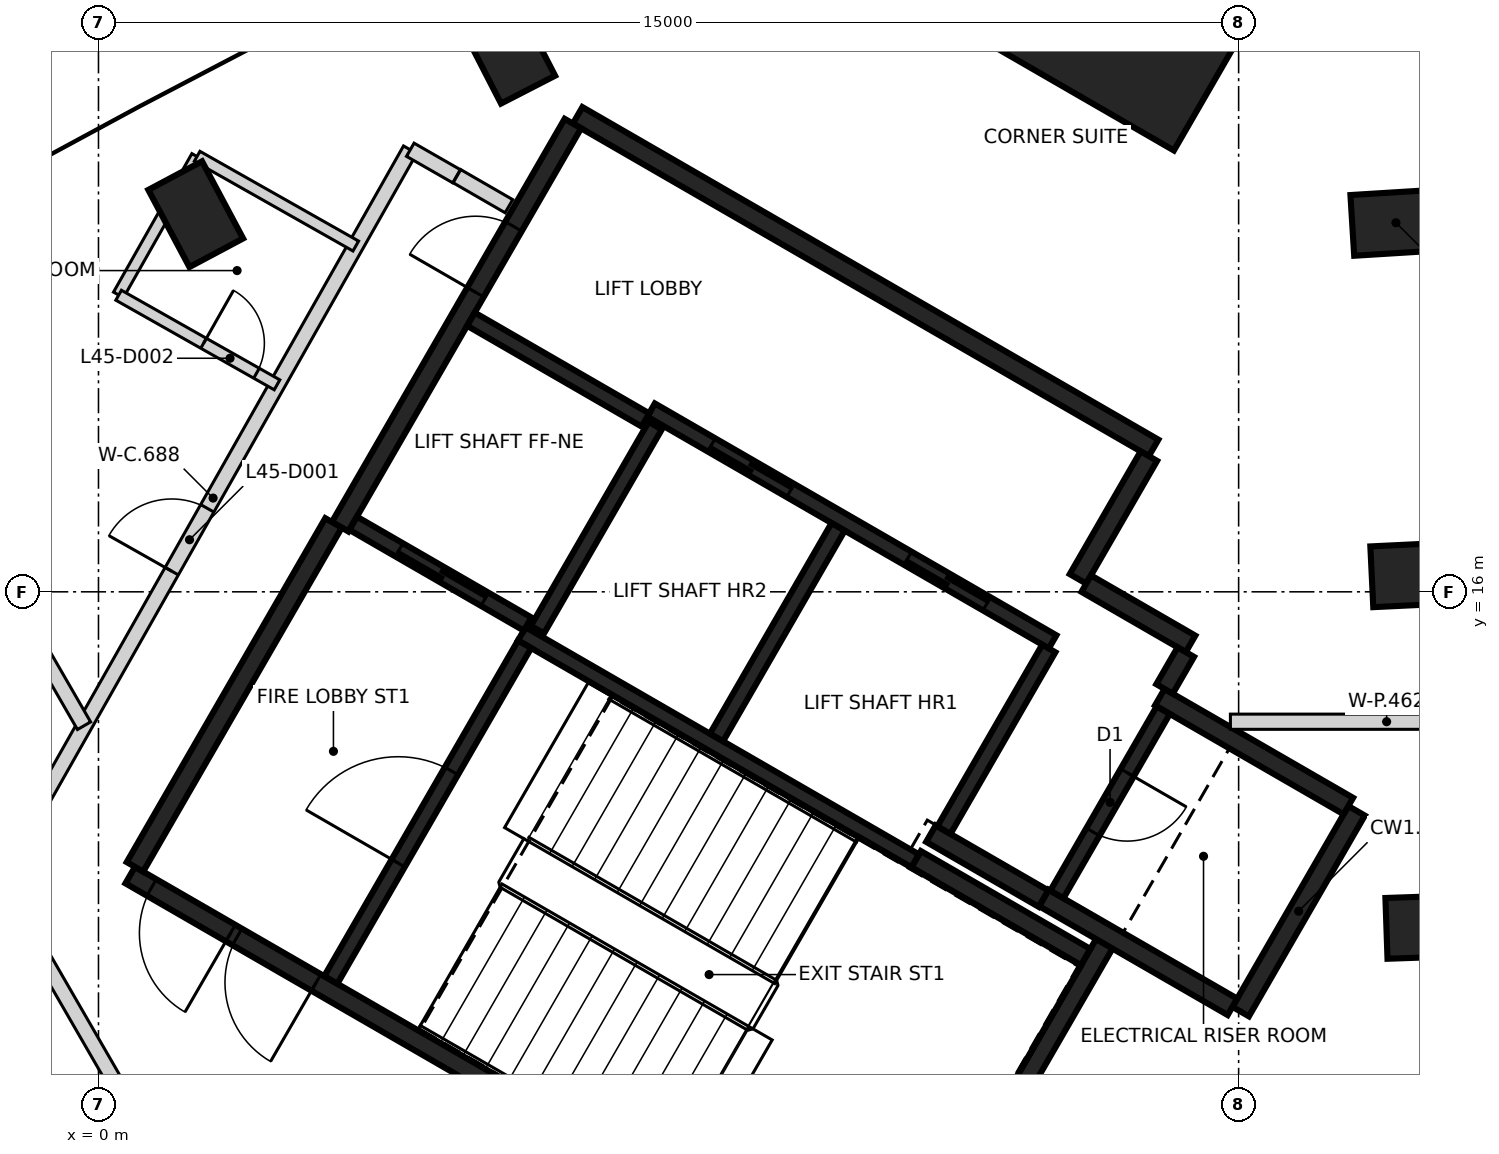
"""IFC4 building model, lengths in metres.
Left out: names, types, materials, properties, quantities, classifications, styles, units other than length and angle.
Written with IfcOpenShell. Run it as: python <this file> out.ifc"""

import sys

from ifc_helpers import new_model, si_unit, direction, frame, frame_2d, origin, origin_2d, place, context, subcontext, project, spatial, rectangle, extrude, element, fill, save


model = new_model("IFC4")
c1 = context("Model", 3, precision=1e-05, world=origin(), true_north=direction((0.0, 1.0)))
c2 = subcontext(c1, "Body", "Model", "MODEL_VIEW")
j1 = project(units=[si_unit("LENGTHUNIT", "METRE"), si_unit("PLANEANGLEUNIT", "RADIAN")], contexts=[c1])
p1 = place(None, origin())
s1 = spatial("IfcSite", under=j1, at=p1, CompositionType="ELEMENT")
p2 = place(p1, origin())
s2 = spatial("IfcBuilding", under=s1, at=p2, CompositionType="ELEMENT")
p3 = place(p2, frame((0.0, 0.0, 182.8)))
s3 = spatial("IfcBuildingStorey", under=s2, at=p3, CompositionType="ELEMENT", Elevation=182.8)
for number, where, z_axis, x_axis in (
    (1, (17.519, 11.592, -0.35), (0.0, 0.0, 1.0), (0.999, 0.034, 0.0)),
    (2, (17.326, 16.226, -0.35), (0.0, 0.0, 1.0), (0.999, 0.048, 0.0)),
    (3, (17.07, 20.856, -0.35), (0.0, 0.0, 1.0), (0.998, 0.062, 0.0)),
    (4, (5.388, 23.118, -0.35), (0.0, 0.0, 1.0), (-0.458, 0.889, 0.0)),
    (5, (1.279, 20.968, -0.35), (0.0, 0.0, 1.0), (-0.47, 0.883, 0.0)),
):
    element("IfcColumn", number, at=place(p3, frame(where, z_axis=z_axis, x_axis=x_axis)), inside=s3, PredefinedType="COLUMN", context=c2, shape_type="SweptSolid", body=[
        extrude(rectangle(XDim=1.15, YDim=0.8, at=origin_2d()), origin(), (0.0, 0.0, 1.0), 3.6),
    ])
p4 = place(p3, frame((13.78, 23.867, -0.35), z_axis=(0.0, 0.0, 1.0), x_axis=(0.5, 0.866025403784, 0.0)))
e6 = element("IfcColumn", 6, at=p4, inside=s3, PredefinedType="COLUMN", context=c2, shape_type="SweptSolid", body=[
    extrude(rectangle(XDim=3.2, YDim=2.7, at=origin_2d()), origin(), (0.0, 0.0, 1.0), 3.6),
])
p5 = place(p3, frame((10.42, 6.498, 0.0), z_axis=(0.0, 0.0, 1.0), x_axis=(-0.866021906294, 0.500006057782, 0.0)))
e7 = element("IfcWall", 7, at=p5, inside=s3, PredefinedType="SHEAR", context=c2, shape_type="SweptSolid", body=[
    extrude(rectangle(XDim=11.55, YDim=0.25, at=frame_2d((5.775, 0.0))), origin(), (0.0, 0.0, 1.0), 3.25),
])
p6 = place(p5, frame((10.025, 0.0, 0.0)))
e8 = element("IfcOpeningElement", 8, at=p6, cuts=e7, PredefinedType="OPENING", context=c2, shape_type="SweptSolid", body=[
    extrude(rectangle(XDim=1.2, YDim=2.1, at=frame_2d((0.6, 1.05))), frame((0.0, 0.135, 0.0), z_axis=(0.0, -1.0, 0.0), x_axis=(1.0, 0.0, 0.0)), (0.0, 0.0, 1.0), 0.27),
])
p7 = place(p5, frame((8.725, 0.0, 0.0)))
e9 = element("IfcOpeningElement", 9, at=p7, cuts=e7, PredefinedType="OPENING", context=c2, shape_type="SweptSolid", body=[
    extrude(rectangle(XDim=1.2, YDim=2.1, at=frame_2d((0.6, 1.05))), frame((0.0, 0.135, 0.0), z_axis=(0.0, -1.0, 0.0), x_axis=(1.0, 0.0, 0.0)), (0.0, 0.0, 1.0), 0.27),
])
p8 = place(p3, frame((6.304, 22.269, 0.0), z_axis=(0.0, 0.0, 1.0), x_axis=(0.866022959057, -0.500004234368, 0.0)))
e10 = element("IfcWall", 10, at=p8, inside=s3, PredefinedType="SHEAR", context=c2, shape_type="SweptSolid", body=[
    extrude(rectangle(XDim=8.75, YDim=0.25, at=frame_2d((4.375, 0.0))), origin(), (0.0, 0.0, 1.0), 3.25),
])
p9 = place(p3, frame((3.179, 16.856, 0.0), z_axis=(0.0, 0.0, 1.0), x_axis=(0.500001955336, 0.866024274868, 0.0)))
e11 = element("IfcWall", 11, at=p9, inside=s3, PredefinedType="SHEAR", context=c2, shape_type="SweptSolid", body=[
    extrude(rectangle(XDim=6.125, YDim=0.25, at=frame_2d((3.062, 0.0))), origin(), (0.0, 0.0, 1.0), 3.25),
])
p10 = place(p9, frame((3.563, 0.0, 0.0)))
e12 = element("IfcOpeningElement", 12, at=p10, cuts=e11, PredefinedType="OPENING", context=c2, shape_type="SweptSolid", body=[
    extrude(rectangle(XDim=1.0, YDim=2.1, at=frame_2d((0.5, 1.05))), frame((0.0, 0.135, 0.0), z_axis=(0.0, -1.0, 0.0), x_axis=(1.0, 0.0, 0.0)), (0.0, 0.0, 1.0), 0.27),
])
p11 = place(p3, frame((0.48, 12.381, 0.0), z_axis=(0.0, 0.0, 1.0), x_axis=(0.49999885962, 0.866026062182, 0.0)))
e13 = element("IfcWall", 13, at=p11, inside=s3, PredefinedType="SHEAR", context=c2, shape_type="SweptSolid", body=[
    extrude(rectangle(XDim=5.225, YDim=0.25, at=frame_2d((2.612, 0.0))), origin(), (0.0, 0.0, 1.0), 3.25),
])
p12 = place(p3, frame((13.238, 11.378, 0.0), z_axis=(0.0, 0.0, 1.0), x_axis=(-0.500008851346, -0.866020293397, 0.0)))
e14 = element("IfcWall", 14, at=p12, inside=s3, PredefinedType="SHEAR", context=c2, shape_type="SweptSolid", body=[
    extrude(rectangle(XDim=5.51, YDim=0.25, at=frame_2d((2.755, 0.0))), origin(), (0.0, 0.0, 1.0), 3.25),
])
p13 = place(p3, frame((16.552, 13.119, 0.0), z_axis=(0.0, 0.0, 1.0), x_axis=(-0.499978833458, -0.866037623948, 0.0)))
e15 = element("IfcWall", 15, at=p13, inside=s3, PredefinedType="SHEAR", context=c2, shape_type="SweptSolid", body=[
    extrude(rectangle(XDim=3.05, YDim=0.25, at=frame_2d((1.525, 0.0))), origin(), (0.0, 0.0, 1.0), 3.25),
])
p14 = place(p3, frame((14.918, 10.54, 0.0), z_axis=(0.0, 0.0, 1.0), x_axis=(-0.866063538972, 0.499933942099, 0.0)))
e16 = element("IfcWall", 16, at=p14, inside=s3, PredefinedType="SHEAR", context=c2, shape_type="SweptSolid", body=[
    extrude(rectangle(XDim=2.865, YDim=0.25, at=frame_2d((1.432, 0.0))), origin(), (0.0, 0.0, 1.0), 3.25),
])
p15 = place(p3, frame((13.963, 14.614, 0.0), z_axis=(0.0, 0.0, 1.0), x_axis=(0.866042235819, -0.499970844928, 0.0)))
e17 = element("IfcWall", 17, at=p15, inside=s3, PredefinedType="SHEAR", context=c2, shape_type="SweptSolid", body=[
    extrude(rectangle(XDim=2.865, YDim=0.25, at=frame_2d((1.432, 0.0))), origin(), (0.0, 0.0, 1.0), 3.25),
])
p16 = place(p3, frame((10.757, 12.481, 0.0), z_axis=(0.0, 0.0, 1.0), x_axis=(0.866022940537, -0.500004266446, 0.0)))
e18 = element("IfcWall", 18, at=p16, inside=s3, PredefinedType="SHEAR", context=c2, shape_type="SweptSolid", body=[
    extrude(rectangle(XDim=2.575, YDim=0.25, at=frame_2d((1.287, 0.0))), origin(), (0.0, 0.0, 1.0), 3.25),
])
p17 = place(p3, frame((13.819, 17.785, 0.0), z_axis=(0.0, 0.0, 1.0), x_axis=(-0.500039802285, -0.866002422705, 0.0)))
e19 = element("IfcWall", 19, at=p17, inside=s3, PredefinedType="SHEAR", context=c2, shape_type="SweptSolid", body=[
    extrude(rectangle(XDim=1.865, YDim=0.25, at=frame_2d((0.932, 0.0))), origin(), (0.0, 0.0, 1.0), 3.25),
])
p18 = place(p3, frame((12.433, 11.964, 0.0), z_axis=(0.0, 0.0, 1.0), x_axis=(-0.866038183914, 0.499977863513, 0.0)))
e20 = element("IfcWall", 20, at=p18, inside=s3, PredefinedType="SHEAR", context=c2, shape_type="SweptSolid", body=[
    extrude(rectangle(XDim=1.71, YDim=0.25, at=frame_2d((0.855, 0.0))), origin(), (0.0, 0.0, 1.0), 3.25),
])
p19 = place(p3, frame((12.995, 16.108, 0.0), z_axis=(0.0, 0.0, 1.0), x_axis=(0.866044474677, -0.49996696679, 0.0)))
e21 = element("IfcWall", 21, at=p19, inside=s3, PredefinedType="SHEAR", context=c2, shape_type="SweptSolid", body=[
    extrude(rectangle(XDim=1.584, YDim=0.25, at=frame_2d((0.792, 0.0))), origin(), (0.0, 0.0, 1.0), 3.25),
])
p20 = place(p3, frame((14.305, 15.207, 0.0), z_axis=(0.0, 0.0, 1.0), x_axis=(-0.499848422343, -0.866112899501, 0.0)))
e22 = element("IfcWall", 22, at=p20, inside=s3, PredefinedType="SHEAR", context=c2, shape_type="SweptSolid", body=[
    extrude(rectangle(XDim=0.559, YDim=0.25, at=frame_2d((0.28, 0.0))), origin(), (0.0, 0.0, 1.0), 3.25),
])
p21 = place(p3, frame((12.552, 15.342, 0.0), z_axis=(0.0, 0.0, 1.0), x_axis=(-0.866030299012, 0.499991521122, 0.0)))
e23 = element("IfcWall", 23, at=p21, inside=s3, PredefinedType="SHEAR", context=c2, shape_type="SweptSolid", body=[
    extrude(rectangle(XDim=6.1, YDim=0.2, at=frame_2d((3.05, 0.0))), origin(), (0.0, 0.0, 1.0), 3.25),
])
p22 = place(p21, frame((1.0, 0.0, 0.0)))
e24 = element("IfcOpeningElement", 24, at=p22, cuts=e23, PredefinedType="OPENING", context=c2, shape_type="SweptSolid", body=[
    extrude(rectangle(XDim=1.2, YDim=2.1, at=frame_2d((0.6, 1.05))), frame((0.0, 0.11, 0.0), z_axis=(0.0, -1.0, 0.0), x_axis=(1.0, 0.0, 0.0)), (0.0, 0.0, 1.0), 0.22),
])
p23 = place(p21, frame((3.982, 0.0, 0.0)))
e25 = element("IfcOpeningElement", 25, at=p23, cuts=e23, PredefinedType="OPENING", context=c2, shape_type="SweptSolid", body=[
    extrude(rectangle(XDim=1.2, YDim=2.1, at=frame_2d((0.6, 1.05))), frame((0.0, 0.11, 0.0), z_axis=(0.0, -1.0, 0.0), x_axis=(1.0, 0.0, 0.0)), (0.0, 0.0, 1.0), 0.22),
])
p24 = place(p3, frame((10.743, 12.46, 0.0), z_axis=(0.0, 0.0, 1.0), x_axis=(-0.866018848283, 0.500011354289, 0.0)))
e26 = element("IfcWall", 26, at=p24, inside=s3, PredefinedType="SHEAR", context=c2, shape_type="SweptSolid", body=[
    extrude(rectangle(XDim=5.974, YDim=0.2, at=frame_2d((2.987, 0.0))), origin(), (0.0, 0.0, 1.0), 3.25),
])
p25 = place(p3, frame((3.057, 10.895, 0.0), z_axis=(0.0, 0.0, 1.0), x_axis=(0.500027839223, 0.866009330205, 0.0)))
e27 = element("IfcWall", 27, at=p25, inside=s3, PredefinedType="SHEAR", context=c2, shape_type="SweptSolid", body=[
    extrude(rectangle(XDim=5.098, YDim=0.2, at=frame_2d((2.549, 0.0))), origin(), (0.0, 0.0, 1.0), 3.25),
])
p26 = place(p25, frame((1.774, 0.0, 0.0)))
e28 = element("IfcOpeningElement", 28, at=p26, cuts=e27, PredefinedType="OPENING", context=c2, shape_type="SweptSolid", body=[
    extrude(rectangle(XDim=1.4, YDim=2.1, at=frame_2d((0.7, 1.05))), frame((0.0, 0.11, 0.0), z_axis=(0.0, -1.0, 0.0), x_axis=(1.0, 0.0, 0.0)), (0.0, 0.0, 1.0), 0.22),
])
p27 = place(p3, frame((8.132, 14.084, 0.0), z_axis=(0.0, 0.0, 1.0), x_axis=(0.500030834389, 0.86600760081, 0.0)))
e29 = element("IfcWall", 29, at=p27, inside=s3, PredefinedType="SHEAR", context=c2, shape_type="SweptSolid", body=[
    extrude(rectangle(XDim=3.198, YDim=0.2, at=frame_2d((1.599, 0.0))), origin(), (0.0, 0.0, 1.0), 3.25),
])
p28 = place(p3, frame((14.008, 14.442, 0.0), z_axis=(0.0, 0.0, 1.0), x_axis=(-0.499986818241, -0.866033014143, 0.0)))
e30 = element("IfcWall", 30, at=p28, inside=s3, PredefinedType="SHEAR", context=c2, shape_type="SweptSolid", body=[
    extrude(rectangle(XDim=2.798, YDim=0.2, at=frame_2d((1.399, 0.0))), origin(), (0.0, 0.0, 1.0), 3.25),
])
p29 = place(p28, frame((0.949, 0.0, 0.0)))
e31 = element("IfcOpeningElement", 31, at=p29, cuts=e30, PredefinedType="OPENING", context=c2, shape_type="SweptSolid", body=[
    extrude(rectangle(XDim=0.9, YDim=2.1, at=frame_2d((0.45, 1.05))), frame((0.0, 0.11, 0.0), z_axis=(0.0, -1.0, 0.0), x_axis=(1.0, 0.0, 0.0)), (0.0, 0.0, 1.0), 0.22),
])
p30 = place(p3, frame((12.502, 15.255, 0.0), z_axis=(0.0, 0.0, 1.0), x_axis=(-0.499965018551, -0.866045599391, 0.0)))
e32 = element("IfcWall", 32, at=p30, inside=s3, PredefinedType="SHEAR", context=c2, shape_type="SweptSolid", body=[
    extrude(rectangle(XDim=2.759, YDim=0.2, at=frame_2d((1.379, 0.0))), origin(), (0.0, 0.0, 1.0), 3.25),
])
p31 = place(p3, frame((7.324, 18.187, 0.0), z_axis=(0.0, 0.0, 1.0), x_axis=(-0.499967891604, -0.866043940782, 0.0)))
e33 = element("IfcWall", 33, at=p31, inside=s3, PredefinedType="SHEAR", context=c2, shape_type="SweptSolid", body=[
    extrude(rectangle(XDim=3.1, YDim=0.2, at=frame_2d((1.55, 0.0))), origin(), (0.0, 0.0, 1.0), 3.25),
])
p32 = place(p3, frame((5.646, 15.576, 0.0), z_axis=(0.0, 0.0, 1.0), x_axis=(-0.866018407898, 0.500012117035, 0.0)))
e34 = element("IfcWall", 34, at=p32, inside=s3, PredefinedType="SHEAR", context=c2, shape_type="SweptSolid", body=[
    extrude(rectangle(XDim=2.651, YDim=0.2, at=frame_2d((1.325, 0.0))), origin(), (0.0, 0.0, 1.0), 3.25),
])
p33 = place(p32, frame((0.652, 0.0, 0.0)))
e35 = element("IfcOpeningElement", 35, at=p33, cuts=e34, PredefinedType="OPENING", context=c2, shape_type="SweptSolid", body=[
    extrude(rectangle(XDim=1.3, YDim=2.1, at=frame_2d((0.65, 1.05))), frame((0.0, 0.11, 0.0), z_axis=(0.0, -1.0, 0.0), x_axis=(1.0, 0.0, 0.0)), (0.0, 0.0, 1.0), 0.22),
])
p34 = place(p3, frame((7.196, 18.26, 0.0), z_axis=(0.0, 0.0, 1.0), x_axis=(-0.866018407898, 0.500012117035, 0.0)))
e36 = element("IfcWall", 36, at=p34, inside=s3, PredefinedType="SHEAR", context=c2, shape_type="SweptSolid", body=[
    extrude(rectangle(XDim=2.651, YDim=0.2, at=frame_2d((1.325, 0.0))), origin(), (0.0, 0.0, 1.0), 3.25),
])
p35 = place(p3, frame((-1.084, 12.65, 0.0), z_axis=(0.0, 0.0, 1.0), x_axis=(0.492271892014, 0.870441488173, 0.0)))
e37 = element("IfcWall", 37, at=p35, inside=s3, PredefinedType="PARTITIONING", context=c2, shape_type="SweptSolid", body=[
    extrude(rectangle(XDim=10.531, YDim=0.2, at=frame_2d((5.266, 0.0))), origin(), (0.0, 0.0, 1.0), 3.25),
])
p36 = place(p35, frame((4.161, 0.0, 0.0)))
e38 = element("IfcOpeningElement", 38, at=p36, cuts=e37, PredefinedType="OPENING", context=c2, shape_type="SweptSolid", body=[
    extrude(rectangle(XDim=0.95, YDim=2.1, at=frame_2d((0.475, 1.05))), frame((0.0, 0.11, 0.0), z_axis=(0.0, -1.0, 0.0), x_axis=(1.0, 0.0, 0.0)), (0.0, 0.0, 1.0), 0.22),
])
p37 = place(p3, frame((-0.964, 11.595, 0.0), z_axis=(0.0, 0.0, 1.0), x_axis=(0.500197000638, -0.865911635534, 0.0)))
e39 = element("IfcWall", 39, at=p37, inside=s3, PredefinedType="PARTITIONING", context=c2, shape_type="SweptSolid", body=[
    extrude(rectangle(XDim=2.523, YDim=0.2, at=frame_2d((1.262, 0.0))), origin(), (0.0, 0.0, 1.0), 3.25),
])
p38 = place(p3, frame((4.102, 21.816, 0.0), z_axis=(0.0, 0.0, 1.0), x_axis=(0.867664502326, -0.497150189986, 0.0)))
e40 = element("IfcWall", 40, at=p38, inside=s3, PredefinedType="PARTITIONING", context=c2, shape_type="SweptSolid", body=[
    extrude(rectangle(XDim=0.702, YDim=0.2, at=frame_2d((0.351, 0.0))), origin(), (0.0, 0.0, 1.0), 3.25),
])
p39 = place(p3, frame((4.716, 21.468, 0.0), z_axis=(0.0, 0.0, 1.0), x_axis=(0.865912682783, -0.500195187698, 0.0)))
e41 = element("IfcWall", 41, at=p39, inside=s3, PredefinedType="PARTITIONING", context=c2, shape_type="SweptSolid", body=[
    extrude(rectangle(XDim=0.79, YDim=0.2, at=frame_2d((0.395, 0.0))), origin(), (0.0, 0.0, 1.0), 3.25),
])
p40 = place(p3, frame((-3.597, 20.142, 0.0), z_axis=(0.0, 0.0, 1.0), x_axis=(0.499864035625, -0.866103888623, 0.0)))
e42 = element("IfcWall", 42, at=p40, inside=s3, PredefinedType="PARTITIONING", context=c2, shape_type="SweptSolid", body=[
    extrude(rectangle(XDim=6.817, YDim=0.2, at=frame_2d((3.408, 0.0))), origin(), (0.0, 0.0, 1.0), 3.25),
])
p41 = place(p3, frame((14.892, 14.291, 0.0), z_axis=(0.0, 0.0, 1.0), x_axis=(1.0, 0.0, 0.0)))
e43 = element("IfcWall", 43, at=p41, inside=s3, PredefinedType="PARTITIONING", context=c2, shape_type="SweptSolid", body=[
    extrude(rectangle(XDim=4.111, YDim=0.2, at=frame_2d((2.055, 0.0))), origin(), (0.0, 0.0, 1.0), 2.35),
])
p42 = place(p3, frame((0.263, 19.906, 0.0), z_axis=(0.0, 0.0, 1.0), x_axis=(0.492479898936, 0.870323818555, 0.0)))
e44 = element("IfcWall", 44, at=p42, inside=s3, PredefinedType="PARTITIONING", context=c2, shape_type="SweptSolid", body=[
    extrude(rectangle(XDim=2.094, YDim=0.15, at=frame_2d((1.047, 0.0))), origin(), (0.0, 0.0, 1.0), 2.35),
])
p43 = place(p3, frame((0.265, 19.902, 0.0), z_axis=(0.0, 0.0, 1.0), x_axis=(0.870355792391, -0.492423389627, 0.0)))
e45 = element("IfcWall", 45, at=p43, inside=s3, PredefinedType="PARTITIONING", context=c2, shape_type="SweptSolid", body=[
    extrude(rectangle(XDim=2.395, YDim=0.15, at=frame_2d((1.197, 0.0))), origin(), (0.0, 0.0, 1.0), 3.25),
])
p44 = place(p43, frame((1.284, 0.0, 0.0)))
e46 = element("IfcOpeningElement", 46, at=p44, cuts=e45, PredefinedType="OPENING", context=c2, shape_type="SweptSolid", body=[
    extrude(rectangle(XDim=0.8, YDim=2.1, at=frame_2d((0.4, 1.05))), frame((0.0, 0.085, 0.0), z_axis=(0.0, -1.0, 0.0), x_axis=(1.0, 0.0, 0.0)), (0.0, 0.0, 1.0), 0.17),
])
p45 = place(p3, frame((1.298, 21.73, 0.0), z_axis=(0.0, 0.0, 1.0), x_axis=(0.870321906411, -0.492483278113, 0.0)))
e47 = element("IfcWall", 47, at=p45, inside=s3, PredefinedType="PARTITIONING", context=c2, shape_type="SweptSolid", body=[
    extrude(rectangle(XDim=2.398, YDim=0.15, at=frame_2d((1.199, 0.0))), origin(), (0.0, 0.0, 1.0), 2.35),
])
p46 = place(p33, origin())
e48 = element("IfcDoor", 48, at=p46, inside=s3, OperationType="SLIDING_TO_RIGHT", PredefinedType="DOOR", context=c2, shape_type="SweptSolid", body=[
    extrude(rectangle(XDim=1.3, YDim=2.1, at=frame_2d((0.65, 1.05))), frame((0.0, 0.025, 0.0), z_axis=(0.0, -1.0, 0.0), x_axis=(1.0, 0.0, 0.0)), (0.0, 0.0, 1.0), 0.05),
])
fill(e35, e48)
p47 = place(p22, origin())
e49 = element("IfcDoor", 49, at=p47, inside=s3, OperationType="DOUBLE_DOOR_SLIDING", PredefinedType="DOOR", context=c2, shape_type="SweptSolid", body=[
    extrude(rectangle(XDim=1.2, YDim=2.1, at=frame_2d((0.6, 1.05))), frame((0.0, 0.025, 0.0), z_axis=(0.0, -1.0, 0.0), x_axis=(1.0, 0.0, 0.0)), (0.0, 0.0, 1.0), 0.05),
])
fill(e24, e49)
p48 = place(p23, origin())
e50 = element("IfcDoor", 50, at=p48, inside=s3, OperationType="DOUBLE_DOOR_SLIDING", PredefinedType="DOOR", context=c2, shape_type="SweptSolid", body=[
    extrude(rectangle(XDim=1.2, YDim=2.1, at=frame_2d((0.6, 1.05))), frame((0.0, 0.025, 0.0), z_axis=(0.0, -1.0, 0.0), x_axis=(1.0, 0.0, 0.0)), (0.0, 0.0, 1.0), 0.05),
])
fill(e25, e50)
p49 = place(p10, origin())
e51 = element("IfcDoor", 51, at=p49, inside=s3, OperationType="SINGLE_SWING_LEFT", PredefinedType="DOOR", context=c2, shape_type="SweptSolid", body=[
    extrude(rectangle(XDim=1.0, YDim=2.1, at=frame_2d((0.5, 1.05))), frame((0.0, 0.025, 0.0), z_axis=(0.0, -1.0, 0.0), x_axis=(1.0, 0.0, 0.0)), (0.0, 0.0, 1.0), 0.05),
])
fill(e12, e51)
p50 = place(p6, origin())
e52 = element("IfcDoor", 52, at=p50, inside=s3, OperationType="SINGLE_SWING_LEFT", PredefinedType="DOOR", context=c2, shape_type="SweptSolid", body=[
    extrude(rectangle(XDim=1.2, YDim=2.1, at=frame_2d((0.6, 1.05))), frame((0.0, 0.025, 0.0), z_axis=(0.0, -1.0, 0.0), x_axis=(1.0, 0.0, 0.0)), (0.0, 0.0, 1.0), 0.05),
])
fill(e8, e52)
p51 = place(p7, origin())
e53 = element("IfcDoor", 53, at=p51, inside=s3, OperationType="SINGLE_SWING_RIGHT", PredefinedType="DOOR", context=c2, shape_type="SweptSolid", body=[
    extrude(rectangle(XDim=1.2, YDim=2.1, at=frame_2d((0.6, 1.05))), frame((0.0, 0.025, 0.0), z_axis=(0.0, -1.0, 0.0), x_axis=(1.0, 0.0, 0.0)), (0.0, 0.0, 1.0), 0.05),
])
fill(e9, e53)
p52 = place(p26, origin())
e54 = element("IfcDoor", 54, at=p52, inside=s3, OperationType="SINGLE_SWING_RIGHT", PredefinedType="DOOR", context=c2, shape_type="SweptSolid", body=[
    extrude(rectangle(XDim=1.4, YDim=2.1, at=frame_2d((0.7, 1.05))), frame((0.0, 0.025, 0.0), z_axis=(0.0, -1.0, 0.0), x_axis=(1.0, 0.0, 0.0)), (0.0, 0.0, 1.0), 0.05),
])
fill(e28, e54)
p53 = place(p29, origin())
e55 = element("IfcDoor", 55, at=p53, inside=s3, OperationType="SINGLE_SWING_LEFT", PredefinedType="DOOR", context=c2, shape_type="SweptSolid", body=[
    extrude(rectangle(XDim=0.9, YDim=2.1, at=frame_2d((0.45, 1.05))), frame((0.0, 0.025, 0.0), z_axis=(0.0, -1.0, 0.0), x_axis=(1.0, 0.0, 0.0)), (0.0, 0.0, 1.0), 0.05),
])
fill(e31, e55)
p54 = place(p36, frame((0.95, 0.0, 0.0), z_axis=(0.0, 0.0, 1.0), x_axis=(-1.0, 0.0, 0.0)))
e56 = element("IfcDoor", 56, at=p54, inside=s3, OperationType="SINGLE_SWING_LEFT", PredefinedType="DOOR", context=c2, shape_type="SweptSolid", body=[
    extrude(rectangle(XDim=0.95, YDim=2.1, at=frame_2d((0.475, 1.05))), frame((0.0, 0.025, 0.0), z_axis=(0.0, -1.0, 0.0), x_axis=(1.0, 0.0, 0.0)), (0.0, 0.0, 1.0), 0.05),
])
fill(e38, e56)
p55 = place(p44, origin())
e57 = element("IfcDoor", 57, at=p55, inside=s3, OperationType="SINGLE_SWING_LEFT", PredefinedType="DOOR", context=c2, shape_type="SweptSolid", body=[
    extrude(rectangle(XDim=0.8, YDim=2.1, at=frame_2d((0.4, 1.05))), frame((0.0, 0.025, 0.0), z_axis=(0.0, -1.0, 0.0), x_axis=(1.0, 0.0, 0.0)), (0.0, 0.0, 1.0), 0.05),
])
fill(e46, e57)
save(model, sys.argv[1])
